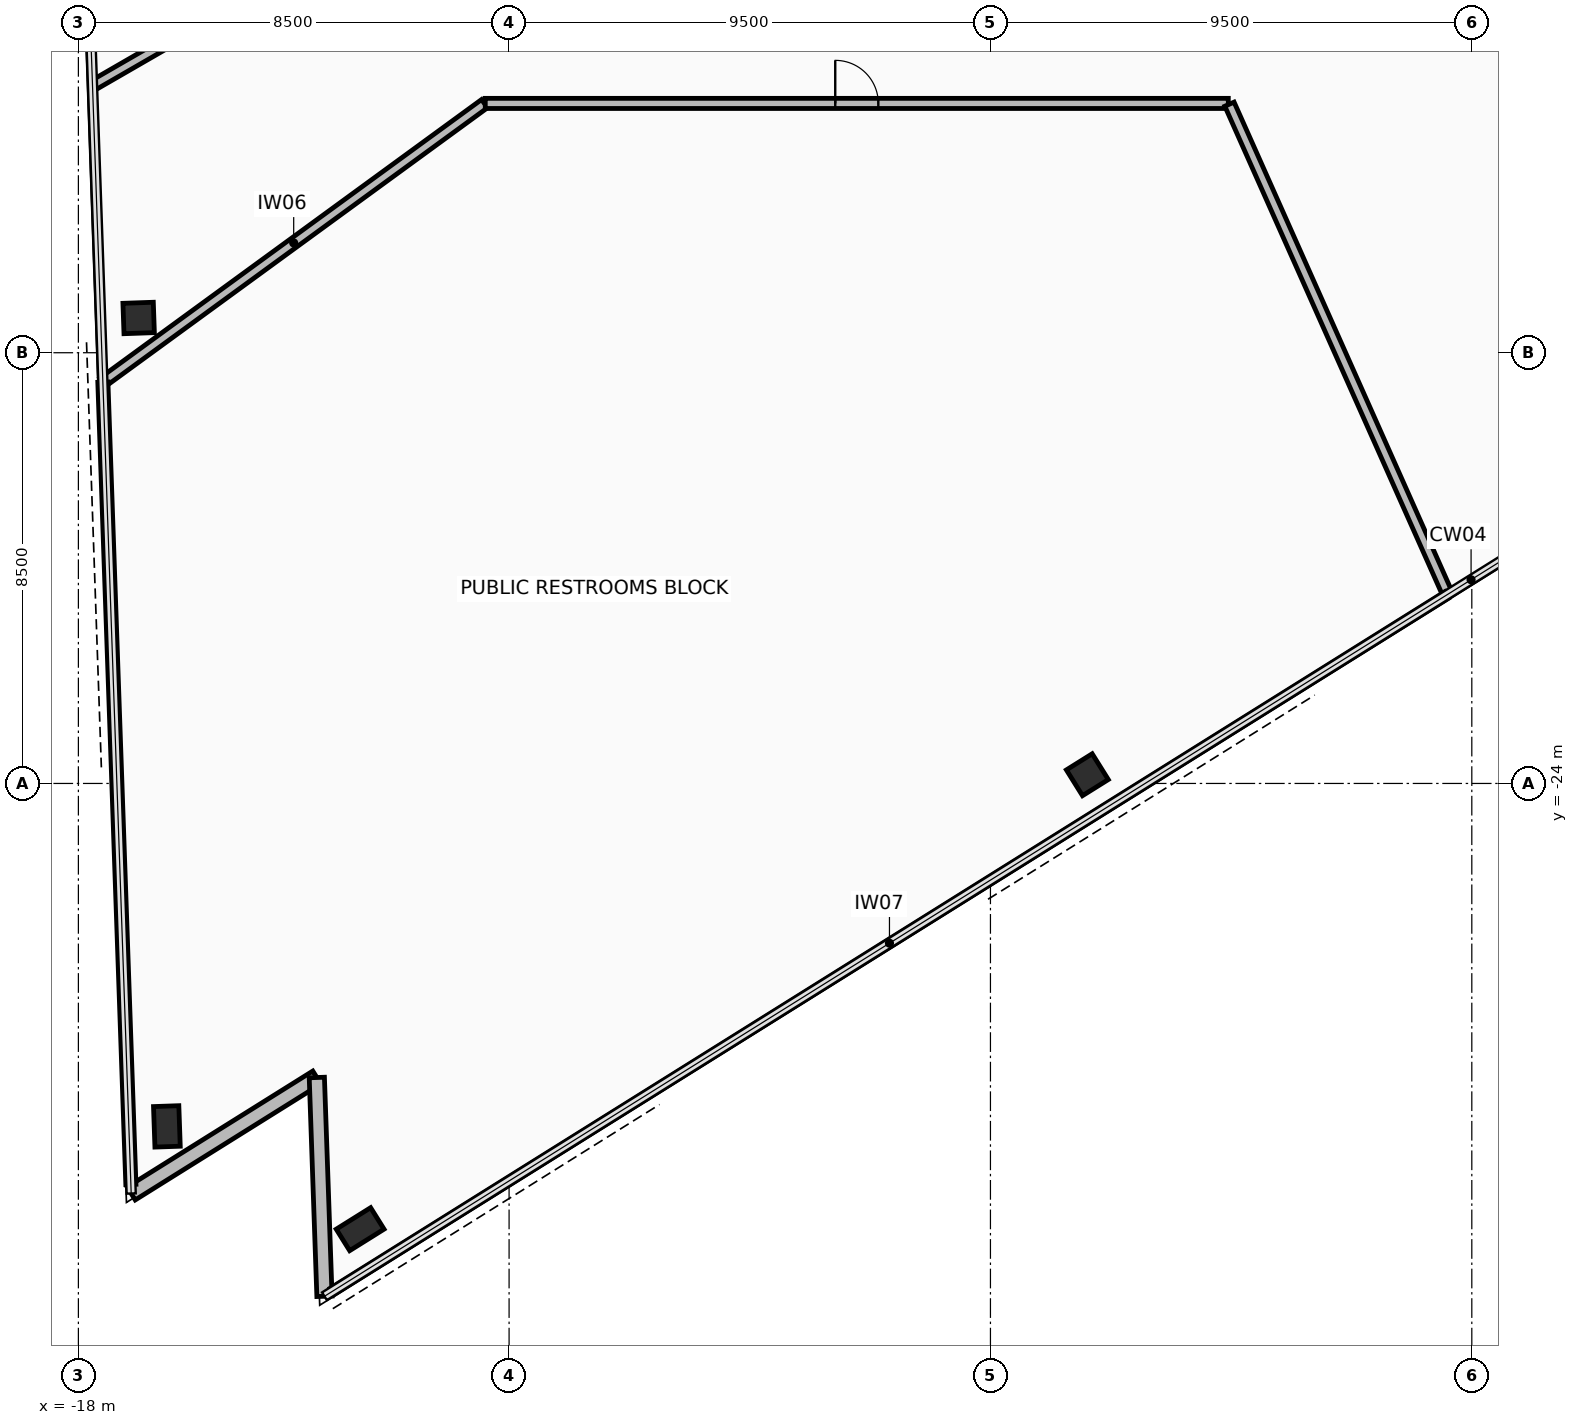
"""IFC4 building model, lengths in metres.
Left out: names, types, materials, properties, quantities, classifications, styles, units other than length and angle.
Written with IfcOpenShell. Run it as: python <this file> out.ifc"""

import sys

from ifc_helpers import new_model, si_unit, direction, frame, frame_2d, origin, origin_2d, place, context, subcontext, project, spatial, rectangle, hollow_rectangle, extrude, element, fill, save


model = new_model("IFC4")
c1 = context("Model", 3, precision=1e-05, world=origin(), true_north=direction((0.0, 1.0)))
c2 = subcontext(c1, "Body", "Model", "MODEL_VIEW")
j1 = project(units=[si_unit("LENGTHUNIT", "METRE"), si_unit("PLANEANGLEUNIT", "RADIAN")], contexts=[c1])
p1 = place(None, origin())
s1 = spatial("IfcSite", under=j1, at=p1, CompositionType="ELEMENT")
p2 = place(p1, origin())
s2 = spatial("IfcBuilding", under=s1, at=p2, CompositionType="ELEMENT")
p3 = place(p2, frame((0.0, 0.0, 153.2)))
s3 = spatial("IfcBuildingStorey", under=s2, at=p3, CompositionType="ELEMENT", Elevation=153.2)
p4 = place(p3, frame((-16.811, -14.814, 0.0), z_axis=(0.0, 0.0, 1.0), x_axis=(-0.034899496703, 0.999390827019, 0.0)))
e1 = element("IfcColumn", 1, at=p4, inside=s3, PredefinedType="COLUMN", context=c2, shape_type="SweptSolid", body=[
    extrude(hollow_rectangle(XDim=0.6, YDim=0.6, WallThickness=0.036, at=origin_2d()), origin(), (0.0, 0.0, 1.0), 3.6),
])
for number, where, z_axis, x_axis in (
    (2, (-16.254, -30.768, 0.0), (0.0, 0.0, 1.0), (-0.035, 0.999, 0.0)),
    (3, (-12.439, -32.796, 0.0), (0.0, 0.0, 1.0), (0.848, 0.53, 0.0)),
):
    element("IfcColumn", number, at=place(p3, frame(where, z_axis=z_axis, x_axis=x_axis)), inside=s3, PredefinedType="COLUMN", context=c2, shape_type="SweptSolid", body=[
        extrude(hollow_rectangle(XDim=0.5, YDim=0.8, WallThickness=0.04, at=origin_2d()), origin(), (0.0, 0.0, 1.0), 3.6),
    ])
p5 = place(p3, frame((1.912, -23.828, 0.0), z_axis=(0.0, 0.0, 1.0), x_axis=(0.848047171272, 0.529920744356, 0.0)))
e4 = element("IfcColumn", 4, at=p5, inside=s3, PredefinedType="COLUMN", context=c2, shape_type="SweptSolid", body=[
    extrude(hollow_rectangle(XDim=0.6, YDim=0.6, WallThickness=0.036, at=origin_2d()), origin(), (0.0, 0.0, 1.0), 3.6),
])
p6 = place(p3, frame((-16.958, -32.092, 0.0), z_axis=(0.0, 0.0, 1.0), x_axis=(0.848068146975, 0.529887174866, 0.0)))
e5 = element("IfcWall", 5, at=p6, inside=s3, PredefinedType="STANDARD", context=c2, shape_type="SweptSolid", body=[
    extrude(rectangle(XDim=4.32, YDim=0.3, at=frame_2d((2.16, 0.0))), origin(), (0.0, 0.0, 1.0), 2.705),
])
p7 = place(p3, frame((-13.294, -29.803, 0.0), z_axis=(0.0, 0.0, 1.0), x_axis=(0.034869079132, -0.999391888761, 0.0)))
e6 = element("IfcWall", 6, at=p7, inside=s3, PredefinedType="STANDARD", context=c2, shape_type="SweptSolid", body=[
    extrude(rectangle(XDim=4.32, YDim=0.3, at=frame_2d((2.16, 0.0))), origin(), (0.0, 0.0, 1.0), 2.705),
])
p8 = place(p3, frame((-17.517, -16.08, 0.0), z_axis=(0.0, 0.0, 1.0), x_axis=(0.807836100195, 0.58940718966, 0.0)))
e7 = element("IfcWall", 7, at=p8, inside=s3, PredefinedType="PARTITIONING", context=c2, shape_type="SweptSolid", body=[
    extrude(rectangle(XDim=9.324, YDim=0.2, at=frame_2d((4.662, 0.0))), origin(), (0.0, 0.0, 1.0), 2.705),
])
p9 = place(p3, frame((-9.97, -10.58, 0.0), z_axis=(0.0, 0.0, 1.0), x_axis=(1.0, 0.0, 0.0)))
e8 = element("IfcWall", 8, at=p9, inside=s3, PredefinedType="PARTITIONING", context=c2, shape_type="SweptSolid", body=[
    extrude(rectangle(XDim=14.664, YDim=0.2, at=frame_2d((7.332, 0.0))), origin(), (0.0, 0.0, 1.0), 2.855),
])
p10 = place(p9, frame((6.907, 0.0, 0.0)))
e9 = element("IfcOpeningElement", 9, at=p10, cuts=e8, PredefinedType="OPENING", context=c2, shape_type="SweptSolid", body=[
    extrude(rectangle(XDim=0.85, YDim=2.1, at=frame_2d((0.425, 1.05))), frame((0.0, 0.11, 0.0), z_axis=(0.0, -1.0, 0.0), x_axis=(1.0, 0.0, 0.0)), (0.0, 0.0, 1.0), 0.22),
])
p11 = place(p3, frame((4.717, -10.595, 0.0), z_axis=(0.0, 0.0, 1.0), x_axis=(0.406751437798, -0.913538870464, 0.0)))
e10 = element("IfcWall", 10, at=p11, inside=s3, PredefinedType="PARTITIONING", context=c2, shape_type="SweptSolid", body=[
    extrude(rectangle(XDim=10.567, YDim=0.2, at=frame_2d((5.284, 0.0))), origin(), (0.0, 0.0, 1.0), 2.705),
])
p12 = place(p3, frame((9.006, -20.28, 0.0), z_axis=(0.0, 0.0, 1.0), x_axis=(-0.848049591294, -0.529916871505, 0.0)))
e11 = element("IfcWall", 11, at=p12, inside=s3, PredefinedType="PARTITIONING", context=c2, shape_type="SweptSolid", body=[
    extrude(rectangle(XDim=25.939, YDim=0.15, at=frame_2d((12.969, 0.0))), origin(), (0.0, 0.0, 1.0), 3.41),
])
p13 = place(p3, frame((-16.964, -31.913, 0.0), z_axis=(0.0, 0.0, 1.0), x_axis=(-0.034889540938, 0.999391174632, 0.0)))
e12 = element("IfcWall", 12, at=p13, inside=s3, PredefinedType="PARTITIONING", context=c2, shape_type="SweptSolid", body=[
    extrude(rectangle(XDim=15.843, YDim=0.2, at=frame_2d((7.921, 0.0))), origin(), (0.0, 0.0, 1.0), 3.41),
])
p14 = place(p3, frame((-11.893, -6.866, 0.0), z_axis=(0.0, 0.0, 1.0), x_axis=(-0.866035775779, -0.499982034748, 0.0)))
e13 = element("IfcWall", 13, at=p14, inside=s3, PredefinedType="PARTITIONING", context=c2, shape_type="SweptSolid", body=[
    extrude(rectangle(XDim=6.73, YDim=0.2, at=frame_2d((3.365, 0.0))), origin(), (0.0, 0.0, 1.0), 2.705),
])
p15 = place(p10, origin())
e14 = element("IfcDoor", 14, at=p15, inside=s3, OperationType="SINGLE_SWING_RIGHT", PredefinedType="DOOR", context=c2, shape_type="SweptSolid", body=[
    extrude(rectangle(XDim=0.85, YDim=2.1, at=frame_2d((0.425, 1.05))), frame((0.0, 0.025, 0.0), z_axis=(0.0, -1.0, 0.0), x_axis=(1.0, 0.0, 0.0)), (0.0, 0.0, 1.0), 0.05),
])
fill(e9, e14)
save(model, sys.argv[1])
